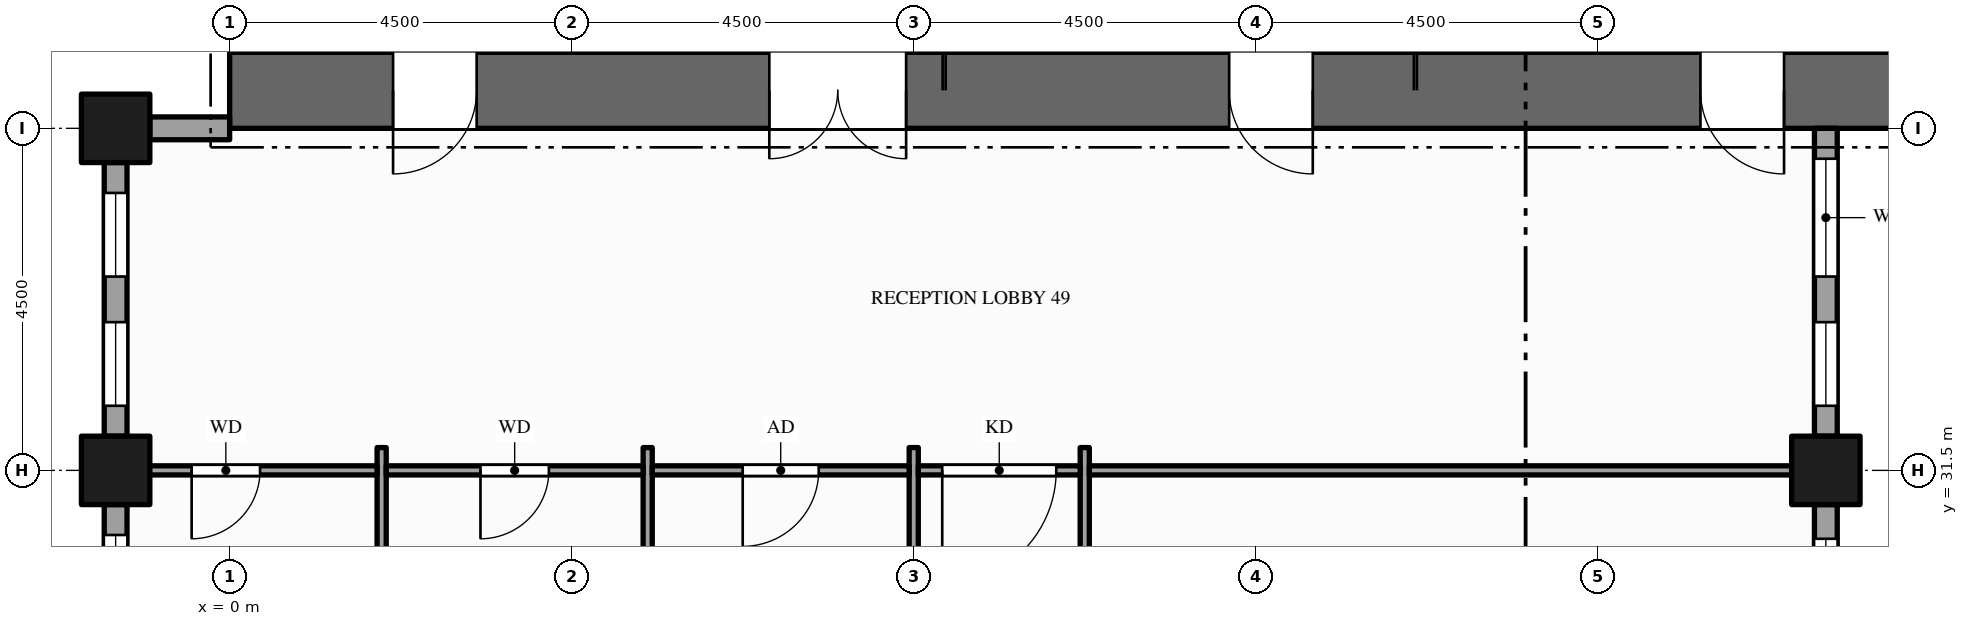
"""IFC4 building model, lengths in metres.
Left out: names, types, materials, properties, quantities, classifications, styles, units other than length and angle.
Written with IfcOpenShell. Run it as: python <this file> out.ifc"""

import sys

from ifc_helpers import new_model, si_unit, direction, frame, frame_2d, origin, origin_2d, place, context, subcontext, project, spatial, rectangle, hollow_rectangle, extrude, element, fill, save


model = new_model("IFC4")
c1 = context("Model", 3, precision=1e-05, world=origin(), true_north=direction((0.0, 1.0)))
c2 = subcontext(c1, "Body", "Model", "MODEL_VIEW")
j1 = project(units=[si_unit("LENGTHUNIT", "METRE"), si_unit("PLANEANGLEUNIT", "RADIAN")], contexts=[c1])
p1 = place(None, origin())
s1 = spatial("IfcSite", under=j1, at=p1, CompositionType="ELEMENT")
p2 = place(p1, origin())
s2 = spatial("IfcBuilding", under=s1, at=p2, CompositionType="ELEMENT")
p3 = place(p2, frame((0.0, 0.0, 159.0)))
s3 = spatial("IfcBuildingStorey", under=s2, at=p3, CompositionType="ELEMENT", Elevation=159.0)
p4 = place(p3, frame((0.0, 36.5, -0.15), z_axis=(0.0, 0.0, 1.0), x_axis=(1.0, 0.0, 0.0)))
e1 = element("IfcWall", 1, at=p4, inside=s3, PredefinedType="SHEAR", context=c2, shape_type="SweptSolid", body=[
    extrude(rectangle(XDim=22.5, YDim=1.0, at=frame_2d((11.25, 0.0))), origin(), (0.0, 0.0, 1.0), 4.0),
])
p5 = place(p4, frame((7.1, 0.0, 0.15)))
e2 = element("IfcOpeningElement", 2, at=p5, cuts=e1, PredefinedType="OPENING", context=c2, shape_type="SweptSolid", body=[
    extrude(rectangle(XDim=1.8, YDim=2.1, at=frame_2d((0.9, 1.05))), frame((0.0, 0.51, 0.0), z_axis=(0.0, -1.0, 0.0), x_axis=(1.0, 0.0, 0.0)), (0.0, 0.0, 1.0), 1.02),
])
p6 = place(p4, frame((13.15, 0.0, 0.15)))
e3 = element("IfcOpeningElement", 3, at=p6, cuts=e1, PredefinedType="OPENING", context=c2, shape_type="SweptSolid", body=[
    extrude(rectangle(XDim=1.1, YDim=2.1, at=frame_2d((0.55, 1.05))), frame((0.0, 0.51, 0.0), z_axis=(0.0, -1.0, 0.0), x_axis=(1.0, 0.0, 0.0)), (0.0, 0.0, 1.0), 1.02),
])
p7 = place(p4, frame((2.15, 0.0, 0.15)))
e4 = element("IfcOpeningElement", 4, at=p7, cuts=e1, PredefinedType="OPENING", context=c2, shape_type="SweptSolid", body=[
    extrude(rectangle(XDim=1.1, YDim=2.1, at=frame_2d((0.55, 1.05))), frame((0.0, 0.51, 0.0), z_axis=(0.0, -1.0, 0.0), x_axis=(1.0, 0.0, 0.0)), (0.0, 0.0, 1.0), 1.02),
])
p8 = place(p4, frame((19.35, 0.0, 0.15)))
e5 = element("IfcOpeningElement", 5, at=p8, cuts=e1, PredefinedType="OPENING", context=c2, shape_type="SweptSolid", body=[
    extrude(rectangle(XDim=1.1, YDim=2.1, at=frame_2d((0.55, 1.05))), frame((0.0, 0.51, 0.0), z_axis=(0.0, -1.0, 0.0), x_axis=(1.0, 0.0, 0.0)), (0.0, 0.0, 1.0), 1.02),
])
for number, where, z_axis, x_axis in (
    (6, (-1.5, 31.5, -0.15), (0.0, 0.0, 1.0), (1.0, 0.0, 0.0)),
    (7, (-1.5, 36.0, -0.15), (0.0, 0.0, 1.0), (1.0, 0.0, 0.0)),
    (8, (21.0, 31.5, -0.15), (0.0, 0.0, 1.0), (1.0, 0.0, 0.0)),
):
    element("IfcColumn", number, at=place(p3, frame(where, z_axis=z_axis, x_axis=x_axis)), inside=s3, PredefinedType="COLUMN", context=c2, shape_type="SweptSolid", body=[
        extrude(hollow_rectangle(XDim=0.9, YDim=0.9, WallThickness=0.045, at=origin_2d()), origin(), (0.0, 0.0, 1.0), 4.0),
    ])
p9 = place(p3, frame((21.0, 28.95, 0.0), z_axis=(0.0, 0.0, 1.0), x_axis=(0.0, 1.0, 0.0)))
e9 = element("IfcWall", 9, at=p9, inside=s3, PredefinedType="STANDARD", context=c2, shape_type="SweptSolid", body=[
    extrude(rectangle(XDim=2.1, YDim=0.3, at=frame_2d((1.05, 0.0))), origin(), (0.0, 0.0, 1.0), 3.149),
])
p10 = place(p9, frame((0.45, 0.0, 0.9)))
e10 = element("IfcOpeningElement", 10, at=p10, cuts=e9, PredefinedType="OPENING", context=c2, shape_type="SweptSolid", body=[
    extrude(rectangle(XDim=1.2, YDim=2.0, at=frame_2d((0.6, 1.0))), frame((0.0, 0.16, 0.0), z_axis=(0.0, -1.0, 0.0), x_axis=(1.0, 0.0, 0.0)), (0.0, 0.0, 1.0), 0.32),
])
p11 = place(p3, frame((21.0, 31.95, 0.0), z_axis=(0.0, 0.0, 1.0), x_axis=(0.0, 1.0, 0.0)))
e11 = element("IfcWall", 11, at=p11, inside=s3, PredefinedType="STANDARD", context=c2, shape_type="SweptSolid", body=[
    extrude(rectangle(XDim=4.05, YDim=0.3, at=frame_2d((2.025, 0.0))), origin(), (0.0, 0.0, 1.0), 3.149),
])
p12 = place(p11, frame((0.4, 0.0, 0.9)))
e12 = element("IfcOpeningElement", 12, at=p12, cuts=e11, PredefinedType="OPENING", context=c2, shape_type="SweptSolid", body=[
    extrude(rectangle(XDim=1.1, YDim=2.0, at=frame_2d((0.55, 1.0))), frame((0.0, 0.16, 0.0), z_axis=(0.0, -1.0, 0.0), x_axis=(1.0, 0.0, 0.0)), (0.0, 0.0, 1.0), 0.32),
])
p13 = place(p11, frame((2.1, 0.0, 0.9)))
e13 = element("IfcOpeningElement", 13, at=p13, cuts=e11, PredefinedType="OPENING", context=c2, shape_type="SweptSolid", body=[
    extrude(rectangle(XDim=1.55, YDim=2.0, at=frame_2d((0.775, 1.0))), frame((0.0, 0.16, 0.0), z_axis=(0.0, -1.0, 0.0), x_axis=(1.0, 0.0, 0.0)), (0.0, 0.0, 1.0), 0.32),
])
p14 = place(p3, frame((0.0, 36.0, 0.0), z_axis=(0.0, 0.0, 1.0), x_axis=(-1.0, 0.0, 0.0)))
e14 = element("IfcWall", 14, at=p14, inside=s3, PredefinedType="STANDARD", context=c2, shape_type="SweptSolid", body=[
    extrude(rectangle(XDim=1.05, YDim=0.3, at=frame_2d((0.525, 0.0))), origin(), (0.0, 0.0, 1.0), 2.87),
])
p15 = place(p3, frame((-1.5, 35.55, 0.0), z_axis=(0.0, 0.0, 1.0), x_axis=(0.0, -1.0, 0.0)))
e15 = element("IfcWall", 15, at=p15, inside=s3, PredefinedType="STANDARD", context=c2, shape_type="SweptSolid", body=[
    extrude(rectangle(XDim=3.6, YDim=0.3, at=frame_2d((1.8, 0.0))), origin(), (0.0, 0.0, 1.0), 3.149),
])
p16 = place(p15, frame((0.4, 0.0, 0.9)))
e16 = element("IfcOpeningElement", 16, at=p16, cuts=e15, PredefinedType="OPENING", context=c2, shape_type="SweptSolid", body=[
    extrude(rectangle(XDim=1.1, YDim=2.0, at=frame_2d((0.55, 1.0))), frame((0.0, 0.16, 0.0), z_axis=(0.0, -1.0, 0.0), x_axis=(1.0, 0.0, 0.0)), (0.0, 0.0, 1.0), 0.32),
])
p17 = place(p15, frame((2.1, 0.0, 0.9)))
e17 = element("IfcOpeningElement", 17, at=p17, cuts=e15, PredefinedType="OPENING", context=c2, shape_type="SweptSolid", body=[
    extrude(rectangle(XDim=1.1, YDim=2.0, at=frame_2d((0.55, 1.0))), frame((0.0, 0.16, 0.0), z_axis=(0.0, -1.0, 0.0), x_axis=(1.0, 0.0, 0.0)), (0.0, 0.0, 1.0), 0.32),
])
p18 = place(p3, frame((-1.5, 31.05, 0.0), z_axis=(0.0, 0.0, 1.0), x_axis=(0.0, -1.0, 0.0)))
e18 = element("IfcWall", 18, at=p18, inside=s3, PredefinedType="STANDARD", context=c2, shape_type="SweptSolid", body=[
    extrude(rectangle(XDim=3.6, YDim=0.3, at=frame_2d((1.8, 0.0))), origin(), (0.0, 0.0, 1.0), 3.149),
])
p19 = place(p18, frame((0.4, 0.0, 0.9)))
e19 = element("IfcOpeningElement", 19, at=p19, cuts=e18, PredefinedType="OPENING", context=c2, shape_type="SweptSolid", body=[
    extrude(rectangle(XDim=1.1, YDim=2.0, at=frame_2d((0.55, 1.0))), frame((0.0, 0.16, 0.0), z_axis=(0.0, -1.0, 0.0), x_axis=(1.0, 0.0, 0.0)), (0.0, 0.0, 1.0), 0.32),
])
p20 = place(p18, frame((2.1, 0.0, 0.9)))
e20 = element("IfcOpeningElement", 20, at=p20, cuts=e18, PredefinedType="OPENING", context=c2, shape_type="SweptSolid", body=[
    extrude(rectangle(XDim=1.1, YDim=2.0, at=frame_2d((0.55, 1.0))), frame((0.0, 0.16, 0.0), z_axis=(0.0, -1.0, 0.0), x_axis=(1.0, 0.0, 0.0)), (0.0, 0.0, 1.0), 0.32),
])
for number, where, z_axis, x_axis in (
    (21, (2.0, 26.7, 0.0), (0.0, 0.0, 1.0), (0.0, 1.0, 0.0)),
    (22, (5.5, 26.7, 0.0), (0.0, 0.0, 1.0), (0.0, 1.0, 0.0)),
):
    element("IfcWall", number, at=place(p3, frame(where, z_axis=z_axis, x_axis=x_axis)), inside=s3, PredefinedType="PARTITIONING", context=c2, shape_type="SweptSolid", body=[
        extrude(rectangle(XDim=5.1, YDim=0.12, at=frame_2d((2.55, 0.0))), origin(), (0.0, 0.0, 1.0), 3.85),
    ])
p21 = place(p3, frame((9.0, 10.95, 0.0), z_axis=(0.0, 0.0, 1.0), x_axis=(0.0, 1.0, 0.0)))
e23 = element("IfcWall", 23, at=p21, inside=s3, PredefinedType="PARTITIONING", context=c2, shape_type="SweptSolid", body=[
    extrude(rectangle(XDim=20.85, YDim=0.12, at=frame_2d((10.425, 0.0))), origin(), (0.0, 0.0, 1.0), 2.6),
])
p22 = place(p21, frame((2.05, 0.0, 0.0)))
e24 = element("IfcOpeningElement", 24, at=p22, cuts=e23, PredefinedType="OPENING", context=c2, shape_type="SweptSolid", body=[
    extrude(rectangle(XDim=1.0, YDim=2.1, at=frame_2d((0.5, 1.05))), frame((0.0, 0.07, 0.0), z_axis=(0.0, -1.0, 0.0), x_axis=(1.0, 0.0, 0.0)), (0.0, 0.0, 1.0), 0.14),
])
p23 = place(p21, frame((6.55, 0.0, 0.0)))
e25 = element("IfcOpeningElement", 25, at=p23, cuts=e23, PredefinedType="OPENING", context=c2, shape_type="SweptSolid", body=[
    extrude(rectangle(XDim=1.0, YDim=2.1, at=frame_2d((0.5, 1.05))), frame((0.0, 0.07, 0.0), z_axis=(0.0, -1.0, 0.0), x_axis=(1.0, 0.0, 0.0)), (0.0, 0.0, 1.0), 0.14),
])
p24 = place(p21, frame((11.805, 0.0, 0.0)))
e26 = element("IfcOpeningElement", 26, at=p24, cuts=e23, PredefinedType="OPENING", context=c2, shape_type="SweptSolid", body=[
    extrude(rectangle(XDim=1.8, YDim=2.1, at=frame_2d((0.9, 1.05))), frame((0.0, 0.07, 0.0), z_axis=(0.0, -1.0, 0.0), x_axis=(1.0, 0.0, 0.0)), (0.0, 0.0, 1.0), 0.14),
])
p25 = place(p3, frame((11.25, 10.95, 0.0), z_axis=(0.0, 0.0, 1.0), x_axis=(0.0, 1.0, 0.0)))
e27 = element("IfcWall", 27, at=p25, inside=s3, PredefinedType="PARTITIONING", context=c2, shape_type="SweptSolid", body=[
    extrude(rectangle(XDim=20.85, YDim=0.12, at=frame_2d((10.425, 0.0))), origin(), (0.0, 0.0, 1.0), 2.6),
])
p26 = place(p25, frame((17.8, 0.0, 0.0)))
e28 = element("IfcOpeningElement", 28, at=p26, cuts=e27, PredefinedType="OPENING", context=c2, shape_type="SweptSolid", body=[
    extrude(rectangle(XDim=1.0, YDim=2.1, at=frame_2d((0.5, 1.05))), frame((0.0, 0.07, 0.0), z_axis=(0.0, -1.0, 0.0), x_axis=(1.0, 0.0, 0.0)), (0.0, 0.0, 1.0), 0.14),
])
p27 = place(p25, frame((4.2, 0.0, 0.0)))
e29 = element("IfcOpeningElement", 29, at=p27, cuts=e27, PredefinedType="OPENING", context=c2, shape_type="SweptSolid", body=[
    extrude(rectangle(XDim=1.2, YDim=2.1, at=frame_2d((0.6, 1.05))), frame((0.0, 0.07, 0.0), z_axis=(0.0, -1.0, 0.0), x_axis=(1.0, 0.0, 0.0)), (0.0, 0.0, 1.0), 0.14),
])
p28 = place(p3, frame((-1.35, 31.5, 0.0), z_axis=(0.0, 0.0, 1.0), x_axis=(1.0, 0.0, 0.0)))
e30 = element("IfcWall", 30, at=p28, inside=s3, PredefinedType="PARTITIONING", context=c2, shape_type="SweptSolid", body=[
    extrude(rectangle(XDim=3.29, YDim=0.12, at=frame_2d((1.645, 0.0))), origin(), (0.0, 0.0, 1.0), 2.87),
])
p29 = place(p28, frame((0.85, 0.0, 0.0)))
e31 = element("IfcOpeningElement", 31, at=p29, cuts=e30, PredefinedType="OPENING", context=c2, shape_type="SweptSolid", body=[
    extrude(rectangle(XDim=0.9, YDim=2.1, at=frame_2d((0.45, 1.05))), frame((0.0, 0.07, 0.0), z_axis=(0.0, -1.0, 0.0), x_axis=(1.0, 0.0, 0.0)), (0.0, 0.0, 1.0), 0.14),
])
p30 = place(p3, frame((2.06, 31.5, 0.0), z_axis=(0.0, 0.0, 1.0), x_axis=(1.0, 0.0, 0.0)))
e32 = element("IfcWall", 32, at=p30, inside=s3, PredefinedType="PARTITIONING", context=c2, shape_type="SweptSolid", body=[
    extrude(rectangle(XDim=3.38, YDim=0.12, at=frame_2d((1.69, 0.0))), origin(), (0.0, 0.0, 1.0), 2.87),
])
p31 = place(p30, frame((1.24, 0.0, 0.0)))
e33 = element("IfcOpeningElement", 33, at=p31, cuts=e32, PredefinedType="OPENING", context=c2, shape_type="SweptSolid", body=[
    extrude(rectangle(XDim=0.9, YDim=2.1, at=frame_2d((0.45, 1.05))), frame((0.0, 0.07, 0.0), z_axis=(0.0, -1.0, 0.0), x_axis=(1.0, 0.0, 0.0)), (0.0, 0.0, 1.0), 0.14),
])
p32 = place(p3, frame((5.56, 31.5, 0.0), z_axis=(0.0, 0.0, 1.0), x_axis=(1.0, 0.0, 0.0)))
e34 = element("IfcWall", 34, at=p32, inside=s3, PredefinedType="PARTITIONING", context=c2, shape_type="SweptSolid", body=[
    extrude(rectangle(XDim=3.38, YDim=0.12, at=frame_2d((1.69, 0.0))), origin(), (0.0, 0.0, 1.0), 2.87),
])
p33 = place(p32, frame((1.19, 0.0, 0.0)))
e35 = element("IfcOpeningElement", 35, at=p33, cuts=e34, PredefinedType="OPENING", context=c2, shape_type="SweptSolid", body=[
    extrude(rectangle(XDim=1.0, YDim=2.1, at=frame_2d((0.5, 1.05))), frame((0.0, 0.07, 0.0), z_axis=(0.0, -1.0, 0.0), x_axis=(1.0, 0.0, 0.0)), (0.0, 0.0, 1.0), 0.14),
])
p34 = place(p3, frame((9.06, 31.5, 0.0), z_axis=(0.0, 0.0, 1.0), x_axis=(1.0, 0.0, 0.0)))
e36 = element("IfcWall", 36, at=p34, inside=s3, PredefinedType="PARTITIONING", context=c2, shape_type="SweptSolid", body=[
    extrude(rectangle(XDim=2.13, YDim=0.12, at=frame_2d((1.065, 0.0))), origin(), (0.0, 0.0, 1.0), 2.87),
])
p35 = place(p34, frame((0.315, 0.0, 0.0)))
e37 = element("IfcOpeningElement", 37, at=p35, cuts=e36, PredefinedType="OPENING", context=c2, shape_type="SweptSolid", body=[
    extrude(rectangle(XDim=1.5, YDim=2.1, at=frame_2d((0.75, 1.05))), frame((0.0, 0.07, 0.0), z_axis=(0.0, -1.0, 0.0), x_axis=(1.0, 0.0, 0.0)), (0.0, 0.0, 1.0), 0.14),
])
p36 = place(p3, frame((11.31, 31.5, 0.0), z_axis=(0.0, 0.0, 1.0), x_axis=(1.0, 0.0, 0.0)))
e38 = element("IfcWall", 38, at=p36, inside=s3, PredefinedType="PARTITIONING", context=c2, shape_type="SweptSolid", body=[
    extrude(rectangle(XDim=9.54, YDim=0.12, at=frame_2d((4.77, 0.0))), origin(), (0.0, 0.0, 1.0), 2.87),
])
p37 = place(p10, origin())
e39 = element("IfcWindow", 39, at=p37, inside=s3, PartitioningType="SINGLE_PANEL", PredefinedType="WINDOW", context=c2, shape_type="SweptSolid", body=[
    extrude(rectangle(XDim=1.2, YDim=2.0, at=frame_2d((0.6, 1.0))), frame((0.0, 0.03, 0.0), z_axis=(0.0, -1.0, 0.0), x_axis=(1.0, 0.0, 0.0)), (0.0, 0.0, 1.0), 0.06),
])
fill(e10, e39)
p38 = place(p12, origin())
e40 = element("IfcWindow", 40, at=p38, inside=s3, PartitioningType="SINGLE_PANEL", PredefinedType="WINDOW", context=c2, shape_type="SweptSolid", body=[
    extrude(rectangle(XDim=1.1, YDim=2.0, at=frame_2d((0.55, 1.0))), frame((0.0, 0.03, 0.0), z_axis=(0.0, -1.0, 0.0), x_axis=(1.0, 0.0, 0.0)), (0.0, 0.0, 1.0), 0.06),
])
fill(e12, e40)
p39 = place(p13, origin())
e41 = element("IfcWindow", 41, at=p39, inside=s3, PartitioningType="SINGLE_PANEL", PredefinedType="WINDOW", context=c2, shape_type="SweptSolid", body=[
    extrude(rectangle(XDim=1.55, YDim=2.0, at=frame_2d((0.775, 1.0))), frame((0.0, 0.03, 0.0), z_axis=(0.0, -1.0, 0.0), x_axis=(1.0, 0.0, 0.0)), (0.0, 0.0, 1.0), 0.06),
])
fill(e13, e41)
p40 = place(p16, origin())
e42 = element("IfcWindow", 42, at=p40, inside=s3, PartitioningType="SINGLE_PANEL", PredefinedType="WINDOW", context=c2, shape_type="SweptSolid", body=[
    extrude(rectangle(XDim=1.1, YDim=2.0, at=frame_2d((0.55, 1.0))), frame((0.0, 0.03, 0.0), z_axis=(0.0, -1.0, 0.0), x_axis=(1.0, 0.0, 0.0)), (0.0, 0.0, 1.0), 0.06),
])
fill(e16, e42)
p41 = place(p17, origin())
e43 = element("IfcWindow", 43, at=p41, inside=s3, PartitioningType="SINGLE_PANEL", PredefinedType="WINDOW", context=c2, shape_type="SweptSolid", body=[
    extrude(rectangle(XDim=1.1, YDim=2.0, at=frame_2d((0.55, 1.0))), frame((0.0, 0.03, 0.0), z_axis=(0.0, -1.0, 0.0), x_axis=(1.0, 0.0, 0.0)), (0.0, 0.0, 1.0), 0.06),
])
fill(e17, e43)
p42 = place(p19, origin())
e44 = element("IfcWindow", 44, at=p42, inside=s3, PartitioningType="SINGLE_PANEL", PredefinedType="WINDOW", context=c2, shape_type="SweptSolid", body=[
    extrude(rectangle(XDim=1.1, YDim=2.0, at=frame_2d((0.55, 1.0))), frame((0.0, 0.03, 0.0), z_axis=(0.0, -1.0, 0.0), x_axis=(1.0, 0.0, 0.0)), (0.0, 0.0, 1.0), 0.06),
])
fill(e19, e44)
p43 = place(p5, origin())
e45 = element("IfcDoor", 45, at=p43, inside=s3, OperationType="DOUBLE_DOOR_SINGLE_SWING", PredefinedType="DOOR", context=c2, shape_type="SweptSolid", body=[
    extrude(rectangle(XDim=1.8, YDim=2.1, at=frame_2d((0.9, 1.05))), frame((0.0, 0.025, 0.0), z_axis=(0.0, -1.0, 0.0), x_axis=(1.0, 0.0, 0.0)), (0.0, 0.0, 1.0), 0.05),
])
fill(e2, e45)
p44 = place(p6, origin())
e46 = element("IfcDoor", 46, at=p44, inside=s3, OperationType="SINGLE_SWING_RIGHT", PredefinedType="DOOR", context=c2, shape_type="SweptSolid", body=[
    extrude(rectangle(XDim=1.1, YDim=2.1, at=frame_2d((0.55, 1.05))), frame((0.0, 0.025, 0.0), z_axis=(0.0, -1.0, 0.0), x_axis=(1.0, 0.0, 0.0)), (0.0, 0.0, 1.0), 0.05),
])
fill(e3, e46)
p45 = place(p7, origin())
e47 = element("IfcDoor", 47, at=p45, inside=s3, OperationType="SINGLE_SWING_LEFT", PredefinedType="DOOR", context=c2, shape_type="SweptSolid", body=[
    extrude(rectangle(XDim=1.1, YDim=2.1, at=frame_2d((0.55, 1.05))), frame((0.0, 0.025, 0.0), z_axis=(0.0, -1.0, 0.0), x_axis=(1.0, 0.0, 0.0)), (0.0, 0.0, 1.0), 0.05),
])
fill(e4, e47)
p46 = place(p8, origin())
e48 = element("IfcDoor", 48, at=p46, inside=s3, OperationType="SINGLE_SWING_RIGHT", PredefinedType="DOOR", context=c2, shape_type="SweptSolid", body=[
    extrude(rectangle(XDim=1.1, YDim=2.1, at=frame_2d((0.55, 1.05))), frame((0.0, 0.025, 0.0), z_axis=(0.0, -1.0, 0.0), x_axis=(1.0, 0.0, 0.0)), (0.0, 0.0, 1.0), 0.05),
])
fill(e5, e48)
p47 = place(p35, origin())
e49 = element("IfcDoor", 49, at=p47, inside=s3, OperationType="SINGLE_SWING_LEFT", PredefinedType="DOOR", context=c2, shape_type="SweptSolid", body=[
    extrude(rectangle(XDim=1.5, YDim=2.1, at=frame_2d((0.75, 1.05))), frame((0.0, 0.025, 0.0), z_axis=(0.0, -1.0, 0.0), x_axis=(1.0, 0.0, 0.0)), (0.0, 0.0, 1.0), 0.05),
])
fill(e37, e49)
p48 = place(p29, origin())
e50 = element("IfcDoor", 50, at=p48, inside=s3, OperationType="SINGLE_SWING_LEFT", PredefinedType="DOOR", context=c2, shape_type="SweptSolid", body=[
    extrude(rectangle(XDim=0.9, YDim=2.1, at=frame_2d((0.45, 1.05))), frame((0.0, 0.025, 0.0), z_axis=(0.0, -1.0, 0.0), x_axis=(1.0, 0.0, 0.0)), (0.0, 0.0, 1.0), 0.05),
])
fill(e31, e50)
p49 = place(p31, origin())
e51 = element("IfcDoor", 51, at=p49, inside=s3, OperationType="SINGLE_SWING_LEFT", PredefinedType="DOOR", context=c2, shape_type="SweptSolid", body=[
    extrude(rectangle(XDim=0.9, YDim=2.1, at=frame_2d((0.45, 1.05))), frame((0.0, 0.025, 0.0), z_axis=(0.0, -1.0, 0.0), x_axis=(1.0, 0.0, 0.0)), (0.0, 0.0, 1.0), 0.05),
])
fill(e33, e51)
p50 = place(p33, origin())
e52 = element("IfcDoor", 52, at=p50, inside=s3, OperationType="SINGLE_SWING_LEFT", PredefinedType="DOOR", context=c2, shape_type="SweptSolid", body=[
    extrude(rectangle(XDim=1.0, YDim=2.1, at=frame_2d((0.5, 1.05))), frame((0.0, 0.025, 0.0), z_axis=(0.0, -1.0, 0.0), x_axis=(1.0, 0.0, 0.0)), (0.0, 0.0, 1.0), 0.05),
])
fill(e35, e52)
save(model, sys.argv[1])
